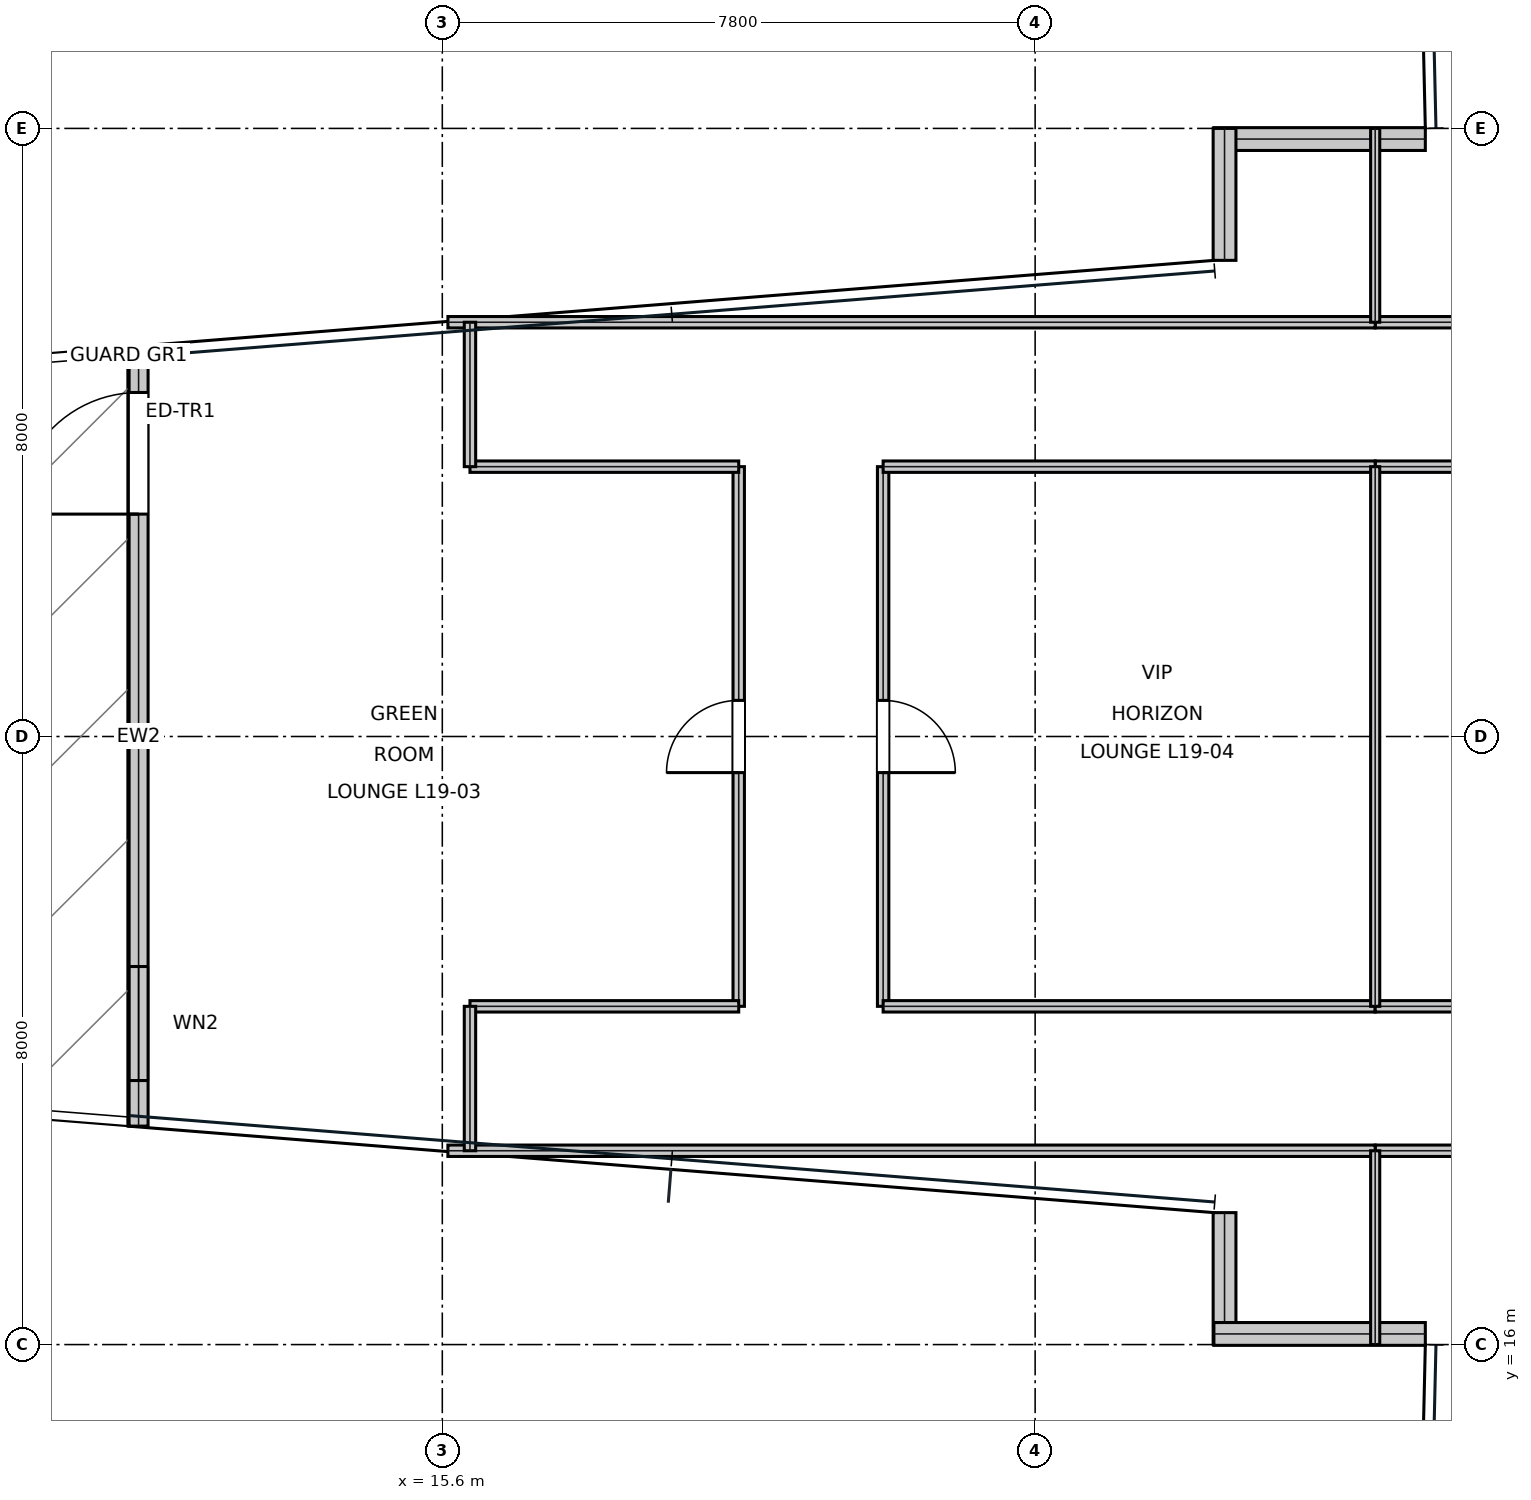
"""IFC4 building model, lengths in metres.
Left out: names, types, materials, properties, quantities, classifications, styles, units other than length and angle.
Written with IfcOpenShell. Run it as: python <this file> out.ifc"""

import sys

from ifc_helpers import new_model, si_unit, direction, frame, frame_2d, origin, place, context, subcontext, project, spatial, rectangle, extrude, element, fill, save


model = new_model("IFC4")
c1 = context("Model", 3, precision=1e-05, world=origin(), true_north=direction((0.0, 1.0)))
c2 = subcontext(c1, "Body", "Model", "MODEL_VIEW")
j1 = project(units=[si_unit("LENGTHUNIT", "METRE"), si_unit("PLANEANGLEUNIT", "RADIAN")], contexts=[c1])
p1 = place(None, origin())
s1 = spatial("IfcSite", under=j1, at=p1, CompositionType="ELEMENT")
p2 = place(p1, origin())
s2 = spatial("IfcBuilding", under=s1, at=p2, CompositionType="ELEMENT")
p3 = place(p2, frame((0.0, 0.0, 86.4)))
s3 = spatial("IfcBuildingStorey", under=s2, at=p3, CompositionType="ELEMENT", Elevation=86.4)
p4 = place(p3, frame((28.534, 31.86, 0.0), z_axis=(0.0, 0.0, 1.0), x_axis=(-1.0, 0.0, 0.0)))
e1 = element("IfcWall", 1, at=p4, inside=s3, PredefinedType="STANDARD", context=c2, shape_type="SweptSolid", body=[
    extrude(rectangle(XDim=2.782, YDim=0.3, at=frame_2d((1.391, 0.0))), origin(), (0.0, 0.0, 1.0), 3.81),
])
p5 = place(p3, frame((25.892, 32.0, 0.0), z_axis=(0.0, 0.0, 1.0), x_axis=(0.0, -1.0, 0.0)))
e2 = element("IfcWall", 2, at=p5, inside=s3, PredefinedType="STANDARD", context=c2, shape_type="SweptSolid", body=[
    extrude(rectangle(XDim=1.736, YDim=0.3, at=frame_2d((0.868, 0.0))), origin(), (0.0, 0.0, 1.0), 3.338),
])
p6 = place(p3, frame((11.604, 29.126, 0.0), z_axis=(0.0, 0.0, 1.0), x_axis=(0.0, -1.0, 0.0)))
e3 = element("IfcWall", 3, at=p6, inside=s3, PredefinedType="STANDARD", context=c2, shape_type="SweptSolid", body=[
    extrude(rectangle(XDim=10.251, YDim=0.25, at=frame_2d((5.126, 0.0))), origin(), (0.0, 0.0, 1.0), 3.181),
])
p7 = place(p6, frame((0.6, 0.0, 0.0)))
e4 = element("IfcOpeningElement", 4, at=p7, cuts=e3, PredefinedType="OPENING", context=c2, shape_type="SweptSolid", body=[
    extrude(rectangle(XDim=1.6, YDim=2.2, at=frame_2d((0.8, 1.1))), frame((0.0, 0.135, 0.0), z_axis=(0.0, -1.0, 0.0), x_axis=(1.0, 0.0, 0.0)), (0.0, 0.0, 1.0), 0.27),
])
p8 = place(p6, frame((8.152, 0.0, 0.95)))
e5 = element("IfcOpeningElement", 5, at=p8, cuts=e3, PredefinedType="OPENING", context=c2, shape_type="SweptSolid", body=[
    extrude(rectangle(XDim=1.5, YDim=1.6, at=frame_2d((0.75, 0.8))), frame((0.0, 0.135, 0.0), z_axis=(0.0, -1.0, 0.0), x_axis=(1.0, 0.0, 0.0)), (0.0, 0.0, 1.0), 0.27),
])
p9 = place(p3, frame((25.892, 17.736, 0.0), z_axis=(0.0, 0.0, 1.0), x_axis=(0.0, -1.0, 0.0)))
e6 = element("IfcWall", 6, at=p9, inside=s3, PredefinedType="STANDARD", context=c2, shape_type="SweptSolid", body=[
    extrude(rectangle(XDim=1.736, YDim=0.3, at=frame_2d((0.868, 0.0))), origin(), (0.0, 0.0, 1.0), 3.338),
])
p10 = place(p3, frame((25.752, 16.14, 0.0), z_axis=(0.0, 0.0, 1.0), x_axis=(1.0, 0.0, 0.0)))
e7 = element("IfcWall", 7, at=p10, inside=s3, PredefinedType="STANDARD", context=c2, shape_type="SweptSolid", body=[
    extrude(rectangle(XDim=2.782, YDim=0.3, at=frame_2d((1.391, 0.0))), origin(), (0.0, 0.0, 1.0), 3.81),
])
p11 = place(p3, frame((19.5, 20.45, 0.0), z_axis=(0.0, 0.0, 1.0), x_axis=(0.0, 1.0, 0.0)))
e8 = element("IfcWall", 8, at=p11, inside=s3, PredefinedType="PARTITIONING", context=c2, shape_type="SweptSolid", body=[
    extrude(rectangle(XDim=7.1, YDim=0.15, at=frame_2d((3.55, 0.0))), origin(), (0.0, 0.0, 1.0), 3.181),
])
p12 = place(p11, frame((3.075, 0.0, 0.0)))
e9 = element("IfcOpeningElement", 9, at=p12, cuts=e8, PredefinedType="OPENING", context=c2, shape_type="SweptSolid", body=[
    extrude(rectangle(XDim=0.95, YDim=2.15, at=frame_2d((0.475, 1.075))), frame((0.0, 0.085, 0.0), z_axis=(0.0, -1.0, 0.0), x_axis=(1.0, 0.0, 0.0)), (0.0, 0.0, 1.0), 0.17),
])
p13 = place(p3, frame((21.4, 20.45, 0.0), z_axis=(0.0, 0.0, 1.0), x_axis=(0.0, 1.0, 0.0)))
e10 = element("IfcWall", 10, at=p13, inside=s3, PredefinedType="PARTITIONING", context=c2, shape_type="SweptSolid", body=[
    extrude(rectangle(XDim=7.1, YDim=0.15, at=frame_2d((3.55, 0.0))), origin(), (0.0, 0.0, 1.0), 3.181),
])
p14 = place(p13, frame((3.075, 0.0, 0.0)))
e11 = element("IfcOpeningElement", 11, at=p14, cuts=e10, PredefinedType="OPENING", context=c2, shape_type="SweptSolid", body=[
    extrude(rectangle(XDim=0.95, YDim=2.15, at=frame_2d((0.475, 1.075))), frame((0.0, 0.085, 0.0), z_axis=(0.0, -1.0, 0.0), x_axis=(1.0, 0.0, 0.0)), (0.0, 0.0, 1.0), 0.17),
])
p15 = place(p3, frame((27.874, 27.55, 0.0), z_axis=(0.0, 0.0, 1.0), x_axis=(1.0, 0.0, 0.0)))
e12 = element("IfcWall", 12, at=p15, inside=s3, PredefinedType="PARTITIONING", context=c2, shape_type="SweptSolid", body=[
    extrude(rectangle(XDim=5.526, YDim=0.15, at=frame_2d((2.763, 0.0))), origin(), (0.0, 0.0, 1.0), 3.181),
])
p16 = place(p15, frame((2.288, 0.0, 0.0)))
e13 = element("IfcOpeningElement", 13, at=p16, cuts=e12, PredefinedType="OPENING", context=c2, shape_type="SweptSolid", body=[
    extrude(rectangle(XDim=0.95, YDim=2.15, at=frame_2d((0.475, 1.075))), frame((0.0, 0.085, 0.0), z_axis=(0.0, -1.0, 0.0), x_axis=(1.0, 0.0, 0.0)), (0.0, 0.0, 1.0), 0.17),
])
p17 = place(p3, frame((27.874, 29.45, 0.0), z_axis=(0.0, 0.0, 1.0), x_axis=(1.0, 0.0, 0.0)))
e14 = element("IfcWall", 14, at=p17, inside=s3, PredefinedType="PARTITIONING", context=c2, shape_type="SweptSolid", body=[
    extrude(rectangle(XDim=5.526, YDim=0.15, at=frame_2d((2.763, 0.0))), origin(), (0.0, 0.0, 1.0), 3.181),
])
p18 = place(p17, frame((2.288, 0.0, 0.0)))
e15 = element("IfcOpeningElement", 15, at=p18, cuts=e14, PredefinedType="OPENING", context=c2, shape_type="SweptSolid", body=[
    extrude(rectangle(XDim=0.95, YDim=2.15, at=frame_2d((0.475, 1.075))), frame((0.0, 0.085, 0.0), z_axis=(0.0, -1.0, 0.0), x_axis=(1.0, 0.0, 0.0)), (0.0, 0.0, 1.0), 0.17),
])
p19 = place(p3, frame((27.874, 18.55, 0.0), z_axis=(0.0, 0.0, 1.0), x_axis=(1.0, 0.0, 0.0)))
e16 = element("IfcWall", 16, at=p19, inside=s3, PredefinedType="PARTITIONING", context=c2, shape_type="SweptSolid", body=[
    extrude(rectangle(XDim=5.526, YDim=0.15, at=frame_2d((2.763, 0.0))), origin(), (0.0, 0.0, 1.0), 3.181),
])
for number, where, z_axis, x_axis in (
    (17, (15.674, 18.55, 0.0), (0.0, 0.0, 1.0), (1.0, 0.0, 0.0)),
    (18, (15.674, 29.45, 0.0), (0.0, 0.0, 1.0), (1.0, 0.0, 0.0)),
):
    element("IfcWall", number, at=place(p3, frame(where, z_axis=z_axis, x_axis=x_axis)), inside=s3, PredefinedType="PARTITIONING", context=c2, shape_type="SweptSolid", body=[
        extrude(rectangle(XDim=12.2, YDim=0.15, at=frame_2d((6.1, 0.0))), origin(), (0.0, 0.0, 1.0), 3.338),
    ])
p20 = place(p3, frame((15.964, 20.45, 0.0), z_axis=(0.0, 0.0, 1.0), x_axis=(1.0, 0.0, 0.0)))
e19 = element("IfcWall", 19, at=p20, inside=s3, PredefinedType="PARTITIONING", context=c2, shape_type="SweptSolid", body=[
    extrude(rectangle(XDim=3.536, YDim=0.15, at=frame_2d((1.768, 0.0))), origin(), (0.0, 0.0, 1.0), 3.81),
])
p21 = place(p3, frame((15.964, 27.55, 0.0), z_axis=(0.0, 0.0, 1.0), x_axis=(1.0, 0.0, 0.0)))
e20 = element("IfcWall", 20, at=p21, inside=s3, PredefinedType="PARTITIONING", context=c2, shape_type="SweptSolid", body=[
    extrude(rectangle(XDim=3.536, YDim=0.15, at=frame_2d((1.768, 0.0))), origin(), (0.0, 0.0, 1.0), 3.391),
])
for number, where, z_axis, x_axis in (
    (21, (15.964, 18.55, 0.0), (0.0, 0.0, 1.0), (0.0, 1.0, 0.0)),
    (22, (15.964, 27.55, 0.0), (0.0, 0.0, 1.0), (0.0, 1.0, 0.0)),
):
    element("IfcWall", number, at=place(p3, frame(where, z_axis=z_axis, x_axis=x_axis)), inside=s3, PredefinedType="PARTITIONING", context=c2, shape_type="SweptSolid", body=[
        extrude(rectangle(XDim=1.9, YDim=0.15, at=frame_2d((0.95, 0.0))), origin(), (0.0, 0.0, 1.0), 3.338),
    ])
for number, where, z_axis, x_axis in (
    (23, (21.4, 27.55, 0.0), (0.0, 0.0, 1.0), (1.0, 0.0, 0.0)),
    (24, (21.4, 20.45, 0.0), (0.0, 0.0, 1.0), (1.0, 0.0, 0.0)),
):
    element("IfcWall", number, at=place(p3, frame(where, z_axis=z_axis, x_axis=x_axis)), inside=s3, PredefinedType="PARTITIONING", context=c2, shape_type="SweptSolid", body=[
        extrude(rectangle(XDim=6.474, YDim=0.15, at=frame_2d((3.237, 0.0))), origin(), (0.0, 0.0, 1.0), 3.391),
    ])
p22 = place(p3, frame((27.874, 20.45, 0.0), z_axis=(0.0, 0.0, 1.0), x_axis=(1.0, 0.0, 0.0)))
e25 = element("IfcWall", 25, at=p22, inside=s3, PredefinedType="PARTITIONING", context=c2, shape_type="SweptSolid", body=[
    extrude(rectangle(XDim=5.526, YDim=0.15, at=frame_2d((2.763, 0.0))), origin(), (0.0, 0.0, 1.0), 3.181),
])
for number, where, z_axis, x_axis in (
    (26, (27.874, 16.0, 0.0), (0.0, 0.0, 1.0), (0.0, 1.0, 0.0)),
    (27, (27.874, 29.45, 0.0), (0.0, 0.0, 1.0), (0.0, 1.0, 0.0)),
):
    element("IfcWall", number, at=place(p3, frame(where, z_axis=z_axis, x_axis=x_axis)), inside=s3, PredefinedType="PARTITIONING", context=c2, shape_type="SweptSolid", body=[
        extrude(rectangle(XDim=2.55, YDim=0.12, at=frame_2d((1.275, 0.0))), origin(), (0.0, 0.0, 1.0), 3.338),
    ])
p23 = place(p3, frame((27.874, 20.45, 0.0), z_axis=(0.0, 0.0, 1.0), x_axis=(0.0, 1.0, 0.0)))
e28 = element("IfcWall", 28, at=p23, inside=s3, PredefinedType="PARTITIONING", context=c2, shape_type="SweptSolid", body=[
    extrude(rectangle(XDim=7.1, YDim=0.12, at=frame_2d((3.55, 0.0))), origin(), (0.0, 0.0, 1.0), 3.181),
])
p24 = place(p7, frame((1.6, 0.0, 0.0), z_axis=(0.0, 0.0, 1.0), x_axis=(-1.0, 0.0, 0.0)))
e29 = element("IfcDoor", 29, at=p24, inside=s3, OperationType="SINGLE_SWING_LEFT", PredefinedType="DOOR", context=c2, shape_type="SweptSolid", body=[
    extrude(rectangle(XDim=1.6, YDim=2.2, at=frame_2d((0.8, 1.1))), frame((0.0, 0.025, 0.0), z_axis=(0.0, -1.0, 0.0), x_axis=(1.0, 0.0, 0.0)), (0.0, 0.0, 1.0), 0.05),
])
fill(e4, e29)
p25 = place(p8, origin())
e30 = element("IfcWindow", 30, at=p25, inside=s3, PartitioningType="SINGLE_PANEL", PredefinedType="WINDOW", context=c2, shape_type="SweptSolid", body=[
    extrude(rectangle(XDim=1.5, YDim=1.6, at=frame_2d((0.75, 0.8))), frame((0.0, 0.03, 0.0), z_axis=(0.0, -1.0, 0.0), x_axis=(1.0, 0.0, 0.0)), (0.0, 0.0, 1.0), 0.06),
])
fill(e5, e30)
p26 = place(p12, origin())
e31 = element("IfcDoor", 31, at=p26, inside=s3, OperationType="SINGLE_SWING_LEFT", PredefinedType="DOOR", context=c2, shape_type="SweptSolid", body=[
    extrude(rectangle(XDim=0.95, YDim=2.15, at=frame_2d((0.475, 1.075))), frame((0.0, 0.025, 0.0), z_axis=(0.0, -1.0, 0.0), x_axis=(1.0, 0.0, 0.0)), (0.0, 0.0, 1.0), 0.05),
])
fill(e9, e31)
p27 = place(p14, frame((0.95, 0.0, 0.0), z_axis=(0.0, 0.0, 1.0), x_axis=(-1.0, 0.0, 0.0)))
e32 = element("IfcDoor", 32, at=p27, inside=s3, OperationType="SINGLE_SWING_RIGHT", PredefinedType="DOOR", context=c2, shape_type="SweptSolid", body=[
    extrude(rectangle(XDim=0.95, YDim=2.15, at=frame_2d((0.475, 1.075))), frame((0.0, 0.025, 0.0), z_axis=(0.0, -1.0, 0.0), x_axis=(1.0, 0.0, 0.0)), (0.0, 0.0, 1.0), 0.05),
])
fill(e11, e32)
save(model, sys.argv[1])
